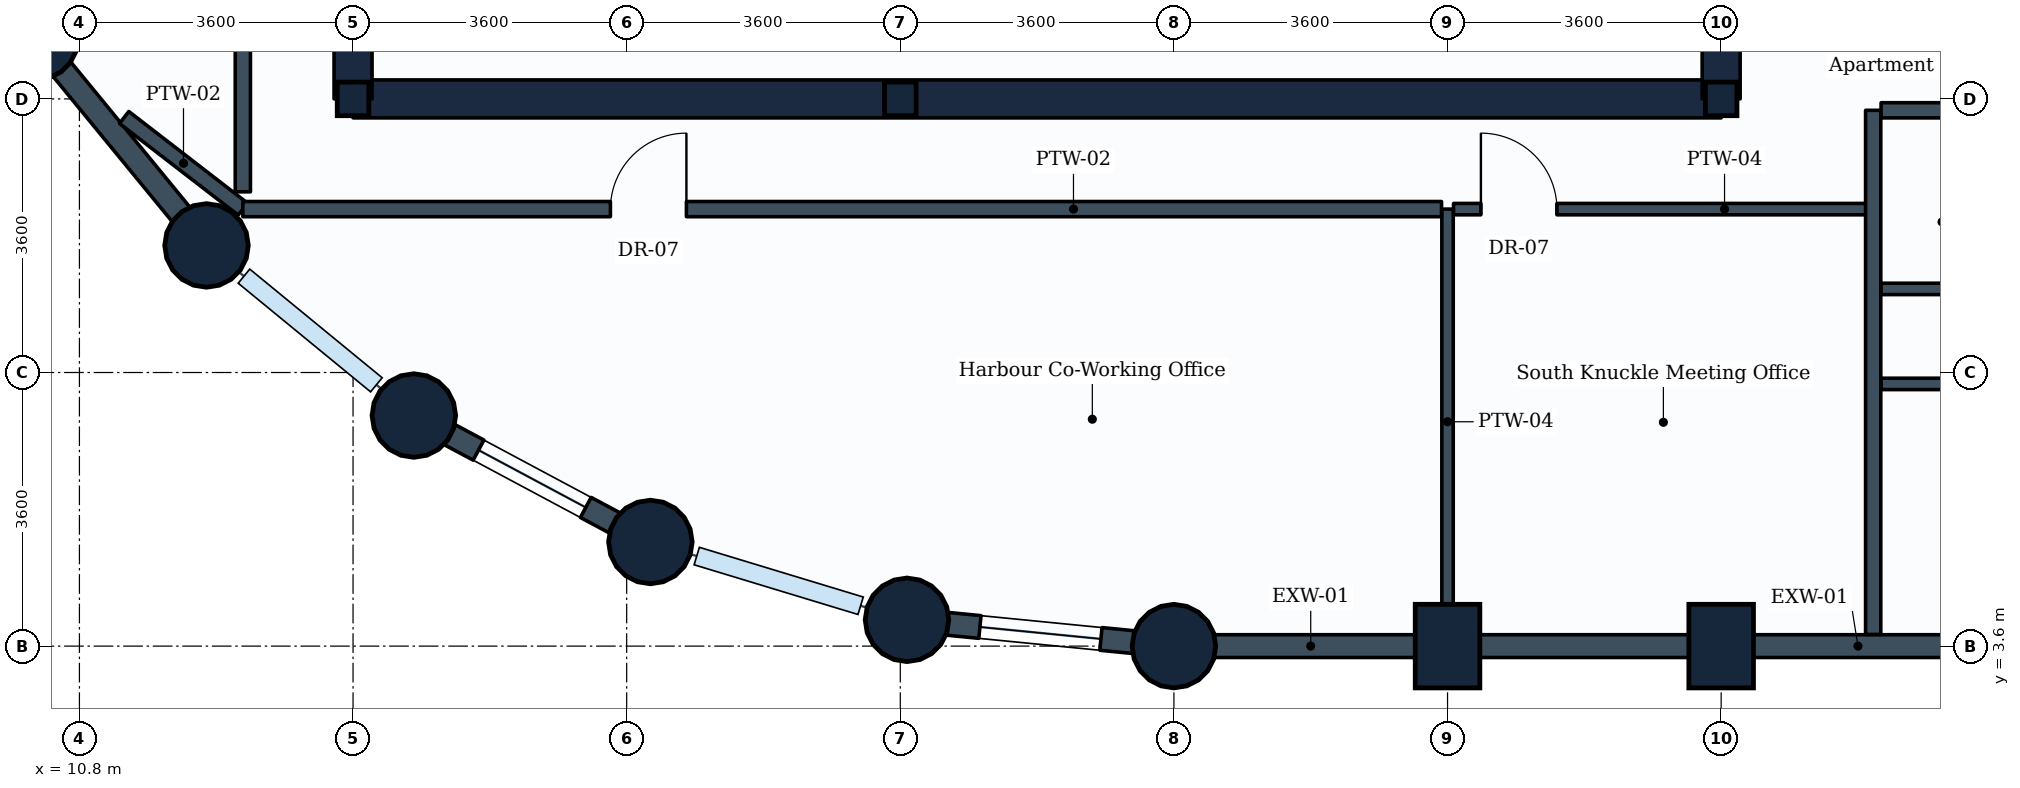
"""IFC4 building model, lengths in metres.
Left out: names, types, materials, properties, quantities, classifications, styles, units other than length and angle.
Written with IfcOpenShell. Run it as: python <this file> out.ifc"""

import sys

from ifc_helpers import new_model, si_unit, direction, frame, frame_2d, origin, origin_2d, place, context, subcontext, project, spatial, rectangle, circle, i_section, extrude, element, fill, save


model = new_model("IFC4")
c1 = context("Model", 3, precision=1e-05, world=origin(), true_north=direction((0.0, 1.0)))
c2 = subcontext(c1, "Body", "Model", "MODEL_VIEW")
j1 = project(units=[si_unit("LENGTHUNIT", "METRE"), si_unit("PLANEANGLEUNIT", "RADIAN")], contexts=[c1])
p1 = place(None, origin())
s1 = spatial("IfcSite", under=j1, at=p1, CompositionType="ELEMENT")
p2 = place(p1, origin())
s2 = spatial("IfcBuilding", under=s1, at=p2, CompositionType="ELEMENT")
p3 = place(p2, frame((0.0, 0.0, 123.8)))
s3 = spatial("IfcBuildingStorey", under=s2, at=p3, CompositionType="ELEMENT", Elevation=123.8)
for number, where, z_axis, x_axis in (
    (1, (10.234, 11.6, 0.0), (0.0, 0.0, 1.0), (1.0, 0.0, 0.0)),
    (2, (12.472, 8.872, 0.0), (0.0, 0.0, 1.0), (1.0, 0.0, 0.0)),
):
    element("IfcColumn", number, at=place(p3, frame(where, z_axis=z_axis, x_axis=x_axis)), inside=s3, PredefinedType="COLUMN", context=c2, shape_type="SweptSolid", body=[
        extrude(circle(Radius=0.55, at=origin_2d()), origin(), (0.0, 0.0, 1.0), 3.8),
    ])
p4 = place(p3, frame((14.4, 10.8, 0.0), z_axis=(0.0, 0.0, 1.0), x_axis=(1.0, 0.0, 0.0)))
e3 = element("IfcColumn", 3, at=p4, inside=s3, PredefinedType="COLUMN", context=c2, shape_type="SweptSolid", body=[
    extrude(i_section(OverallWidth=0.416, OverallDepth=0.442, WebThickness=0.025, FlangeThickness=0.041, FilletRadius=0.015, at=origin_2d()), origin(), (0.0, 0.0, 1.0), 3.8),
])
for number, where, z_axis, x_axis in (
    (4, (15.2, 6.634, 0.0), (0.0, 0.0, 1.0), (1.0, 0.0, 0.0)),
    (5, (18.312, 4.97, 0.0), (0.0, 0.0, 1.0), (1.0, 0.0, 0.0)),
):
    element("IfcColumn", number, at=place(p3, frame(where, z_axis=z_axis, x_axis=x_axis)), inside=s3, PredefinedType="COLUMN", context=c2, shape_type="SweptSolid", body=[
        extrude(circle(Radius=0.55, at=origin_2d()), origin(), (0.0, 0.0, 1.0), 3.8),
    ])
p5 = place(p3, frame((21.6, 10.8, 0.0), z_axis=(0.0, 0.0, 1.0), x_axis=(1.0, 0.0, 0.0)))
e6 = element("IfcColumn", 6, at=p5, inside=s3, PredefinedType="COLUMN", context=c2, shape_type="SweptSolid", body=[
    extrude(i_section(OverallWidth=0.416, OverallDepth=0.442, WebThickness=0.025, FlangeThickness=0.041, FilletRadius=0.015, at=origin_2d()), origin(), (0.0, 0.0, 1.0), 3.8),
])
for number, where, z_axis, x_axis in (
    (7, (21.688, 3.946, 0.0), (0.0, 0.0, 1.0), (1.0, 0.0, 0.0)),
    (8, (25.2, 3.6, 0.0), (0.0, 0.0, 1.0), (1.0, 0.0, 0.0)),
):
    element("IfcColumn", number, at=place(p3, frame(where, z_axis=z_axis, x_axis=x_axis)), inside=s3, PredefinedType="COLUMN", context=c2, shape_type="SweptSolid", body=[
        extrude(circle(Radius=0.55, at=origin_2d()), origin(), (0.0, 0.0, 1.0), 3.8),
    ])
for number, where, z_axis, x_axis in (
    (9, (28.8, 3.6, 0.0), (0.0, 0.0, 1.0), (1.0, 0.0, 0.0)),
    (10, (32.4, 3.6, 0.0), (0.0, 0.0, 1.0), (1.0, 0.0, 0.0)),
):
    element("IfcColumn", number, at=place(p3, frame(where, z_axis=z_axis, x_axis=x_axis)), inside=s3, PredefinedType="COLUMN", context=c2, shape_type="SweptSolid", body=[
        extrude(rectangle(XDim=0.85, YDim=1.1, at=origin_2d()), origin(), (0.0, 0.0, 1.0), 3.8),
    ])
p6 = place(p3, frame((32.4, 10.8, 0.0), z_axis=(0.0, 0.0, 1.0), x_axis=(1.0, 0.0, 0.0)))
e11 = element("IfcColumn", 11, at=p6, inside=s3, PredefinedType="COLUMN", context=c2, shape_type="SweptSolid", body=[
    extrude(i_section(OverallWidth=0.416, OverallDepth=0.442, WebThickness=0.025, FlangeThickness=0.041, FilletRadius=0.015, at=origin_2d()), origin(), (0.0, 0.0, 1.0), 3.8),
])
p7 = place(p3, frame((28.8, 3.6, 0.0), z_axis=(0.0, 0.0, 1.0), x_axis=(-1.0, 0.0, 0.0)))
e12 = element("IfcWall", 12, at=p7, inside=s3, PredefinedType="STANDARD", context=c2, shape_type="SweptSolid", body=[
    extrude(rectangle(XDim=3.6, YDim=0.3, at=frame_2d((1.8, 0.0))), origin(), (0.0, 0.0, 1.0), 2.93),
])
p8 = place(p3, frame((32.4, 3.6, 0.0), z_axis=(0.0, 0.0, 1.0), x_axis=(-1.0, 0.0, 0.0)))
e13 = element("IfcWall", 13, at=p8, inside=s3, PredefinedType="STANDARD", context=c2, shape_type="SweptSolid", body=[
    extrude(rectangle(XDim=3.6, YDim=0.3, at=frame_2d((1.8, 0.0))), origin(), (0.0, 0.0, 1.0), 2.93),
])
p9 = place(p3, frame((36.0, 3.6, 0.0), z_axis=(0.0, 0.0, 1.0), x_axis=(-1.0, 0.0, 0.0)))
e14 = element("IfcWall", 14, at=p9, inside=s3, PredefinedType="STANDARD", context=c2, shape_type="SweptSolid", body=[
    extrude(rectangle(XDim=3.6, YDim=0.3, at=frame_2d((1.8, 0.0))), origin(), (0.0, 0.0, 1.0), 2.93),
])
p10 = place(p3, frame((12.472, 8.872, 0.0), z_axis=(0.0, 0.0, 1.0), x_axis=(-0.634258295121, 0.773121216285, 0.0)))
e15 = element("IfcWall", 15, at=p10, inside=s3, PredefinedType="STANDARD", context=c2, shape_type="SweptSolid", body=[
    extrude(rectangle(XDim=3.529, YDim=0.3, at=frame_2d((1.764, 0.0))), origin(), (0.0, 0.0, 1.0), 2.93),
])
p11 = place(p3, frame((18.312, 4.97, 0.0), z_axis=(0.0, 0.0, 1.0), x_axis=(-0.881846862014, 0.471535907389, 0.0)))
e16 = element("IfcWall", 16, at=p11, inside=s3, PredefinedType="STANDARD", context=c2, shape_type="SweptSolid", body=[
    extrude(rectangle(XDim=3.529, YDim=0.3, at=frame_2d((1.765, 0.0))), origin(), (0.0, 0.0, 1.0), 2.93),
])
p12 = place(p11, frame((0.964, 0.0, 0.85)))
e17 = element("IfcOpeningElement", 17, at=p12, cuts=e16, PredefinedType="OPENING", context=c2, shape_type="SweptSolid", body=[
    extrude(rectangle(XDim=1.6, YDim=1.35, at=frame_2d((0.8, 0.675))), frame((0.0, 0.16, 0.0), z_axis=(0.0, -1.0, 0.0), x_axis=(1.0, 0.0, 0.0)), (0.0, 0.0, 1.0), 0.32),
])
p13 = place(p3, frame((25.2, 3.6, 0.0), z_axis=(0.0, 0.0, 1.0), x_axis=(-0.995183369056, 0.098030923459, 0.0)))
e18 = element("IfcWall", 18, at=p13, inside=s3, PredefinedType="STANDARD", context=c2, shape_type="SweptSolid", body=[
    extrude(rectangle(XDim=3.529, YDim=0.3, at=frame_2d((1.765, 0.0))), origin(), (0.0, 0.0, 1.0), 2.93),
])
p14 = place(p13, frame((0.965, 0.0, 0.85)))
e19 = element("IfcOpeningElement", 19, at=p14, cuts=e18, PredefinedType="OPENING", context=c2, shape_type="SweptSolid", body=[
    extrude(rectangle(XDim=1.6, YDim=1.35, at=frame_2d((0.8, 0.675))), frame((0.0, 0.16, 0.0), z_axis=(0.0, -1.0, 0.0), x_axis=(1.0, 0.0, 0.0)), (0.0, 0.0, 1.0), 0.32),
])
p15 = place(p3, frame((14.4, 10.8, 0.0), z_axis=(0.0, 0.0, 1.0), x_axis=(1.0, 0.0, 0.0)))
e20 = element("IfcWall", 20, at=p15, inside=s3, PredefinedType="SHEAR", context=c2, shape_type="SweptSolid", body=[
    extrude(rectangle(XDim=18.0, YDim=0.5, at=frame_2d((9.0, 0.0))), origin(), (0.0, 0.0, 1.0), 3.48),
])
p16 = place(p3, frame((14.4, 10.8, 0.0), z_axis=(0.0, 0.0, 1.0), x_axis=(0.0, 1.0, 0.0)))
e21 = element("IfcWall", 21, at=p16, inside=s3, PredefinedType="SHEAR", context=c2, shape_type="SweptSolid", body=[
    extrude(rectangle(XDim=14.4, YDim=0.5, at=frame_2d((7.2, 0.0))), origin(), (0.0, 0.0, 1.0), 3.48),
])
p17 = place(p16, frame((11.05, 0.0, 0.0)))
e22 = element("IfcOpeningElement", 22, at=p17, cuts=e21, PredefinedType="OPENING", context=c2, shape_type="SweptSolid", body=[
    extrude(rectangle(XDim=1.1, YDim=2.1, at=frame_2d((0.55, 1.05))), frame((0.0, 0.26, 0.0), z_axis=(0.0, -1.0, 0.0), x_axis=(1.0, 0.0, 0.0)), (0.0, 0.0, 1.0), 0.52),
])
p18 = place(p16, frame((4.9, 0.0, 0.0)))
e23 = element("IfcOpeningElement", 23, at=p18, cuts=e21, PredefinedType="OPENING", context=c2, shape_type="SweptSolid", body=[
    extrude(rectangle(XDim=1.2, YDim=2.1, at=frame_2d((0.6, 1.05))), frame((0.0, 0.26, 0.0), z_axis=(0.0, -1.0, 0.0), x_axis=(1.0, 0.0, 0.0)), (0.0, 0.0, 1.0), 0.52),
])
p19 = place(p16, frame((8.15, 0.0, 0.0)))
e24 = element("IfcOpeningElement", 24, at=p19, cuts=e21, PredefinedType="OPENING", context=c2, shape_type="SweptSolid", body=[
    extrude(rectangle(XDim=0.9, YDim=2.1, at=frame_2d((0.45, 1.05))), frame((0.0, 0.26, 0.0), z_axis=(0.0, -1.0, 0.0), x_axis=(1.0, 0.0, 0.0)), (0.0, 0.0, 1.0), 0.52),
])
p20 = place(p3, frame((32.4, 10.8, 0.0), z_axis=(0.0, 0.0, 1.0), x_axis=(0.0, 1.0, 0.0)))
e25 = element("IfcWall", 25, at=p20, inside=s3, PredefinedType="SHEAR", context=c2, shape_type="SweptSolid", body=[
    extrude(rectangle(XDim=14.4, YDim=0.5, at=frame_2d((7.2, 0.0))), origin(), (0.0, 0.0, 1.0), 3.48),
])
p21 = place(p20, frame((4.35, 0.0, 0.0)))
e26 = element("IfcOpeningElement", 26, at=p21, cuts=e25, PredefinedType="OPENING", context=c2, shape_type="SweptSolid", body=[
    extrude(rectangle(XDim=1.2, YDim=2.1, at=frame_2d((0.6, 1.05))), frame((0.0, 0.26, 0.0), z_axis=(0.0, -1.0, 0.0), x_axis=(1.0, 0.0, 0.0)), (0.0, 0.0, 1.0), 0.52),
])
p22 = place(p20, frame((10.0, 0.0, 0.0)))
e27 = element("IfcOpeningElement", 27, at=p22, cuts=e25, PredefinedType="OPENING", context=c2, shape_type="SweptSolid", body=[
    extrude(rectangle(XDim=1.2, YDim=2.1, at=frame_2d((0.6, 1.05))), frame((0.0, 0.26, 0.0), z_axis=(0.0, -1.0, 0.0), x_axis=(1.0, 0.0, 0.0)), (0.0, 0.0, 1.0), 0.52),
])
p23 = place(p3, frame((28.8, 9.35, 0.0), z_axis=(0.0, 0.0, 1.0), x_axis=(0.0, -1.0, 0.0)))
e28 = element("IfcWall", 28, at=p23, inside=s3, PredefinedType="PARTITIONING", context=c2, shape_type="SweptSolid", body=[
    extrude(rectangle(XDim=5.596, YDim=0.15, at=frame_2d((2.798, 0.0))), origin(), (0.0, 0.0, 1.0), 3.465),
])
p24 = place(p3, frame((12.95, 9.35, 0.0), z_axis=(0.0, 0.0, 1.0), x_axis=(-0.7915325665, 0.611126988579, 0.0)))
e29 = element("IfcWall", 29, at=p24, inside=s3, PredefinedType="PARTITIONING", context=c2, shape_type="SweptSolid", body=[
    extrude(rectangle(XDim=1.973, YDim=0.2, at=frame_2d((0.987, 0.0))), origin(), (0.0, 0.0, 1.0), 2.93),
])
p25 = place(p3, frame((12.95, 9.577, 0.0), z_axis=(0.0, 0.0, 1.0), x_axis=(0.0, 1.0, 0.0)))
e30 = element("IfcWall", 30, at=p25, inside=s3, PredefinedType="PARTITIONING", context=c2, shape_type="SweptSolid", body=[
    extrude(rectangle(XDim=15.544, YDim=0.2, at=frame_2d((7.772, 0.0))), origin(), (0.0, 0.0, 1.0), 3.1),
])
p26 = place(p25, frame((6.763, 0.0, 0.0)))
e31 = element("IfcOpeningElement", 31, at=p26, cuts=e30, PredefinedType="OPENING", context=c2, shape_type="SweptSolid", body=[
    extrude(rectangle(XDim=1.0, YDim=2.1, at=frame_2d((0.5, 1.05))), frame((0.0, 0.11, 0.0), z_axis=(0.0, -1.0, 0.0), x_axis=(1.0, 0.0, 0.0)), (0.0, 0.0, 1.0), 0.22),
])
p27 = place(p3, frame((12.95, 9.35, 0.0), z_axis=(0.0, 0.0, 1.0), x_axis=(1.0, 0.0, 0.0)))
e32 = element("IfcWall", 32, at=p27, inside=s3, PredefinedType="PARTITIONING", context=c2, shape_type="SweptSolid", body=[
    extrude(rectangle(XDim=15.771, YDim=0.2, at=frame_2d((7.885, 0.0))), origin(), (0.0, 0.0, 1.0), 3.1),
])
p28 = place(p27, frame((4.836, 0.0, 0.0)))
e33 = element("IfcOpeningElement", 33, at=p28, cuts=e32, PredefinedType="OPENING", context=c2, shape_type="SweptSolid", body=[
    extrude(rectangle(XDim=1.0, YDim=2.1, at=frame_2d((0.5, 1.05))), frame((0.0, 0.11, 0.0), z_axis=(0.0, -1.0, 0.0), x_axis=(1.0, 0.0, 0.0)), (0.0, 0.0, 1.0), 0.22),
])
p29 = place(p3, frame((28.879, 9.35, 0.0), z_axis=(0.0, 0.0, 1.0), x_axis=(1.0, 0.0, 0.0)))
e34 = element("IfcWall", 34, at=p29, inside=s3, PredefinedType="PARTITIONING", context=c2, shape_type="SweptSolid", body=[
    extrude(rectangle(XDim=5.521, YDim=0.15, at=frame_2d((2.76, 0.0))), origin(), (0.0, 0.0, 1.0), 3.465),
])
p30 = place(p29, frame((0.36, 0.0, 0.0)))
e35 = element("IfcOpeningElement", 35, at=p30, cuts=e34, PredefinedType="OPENING", context=c2, shape_type="SweptSolid", body=[
    extrude(rectangle(XDim=1.0, YDim=2.1, at=frame_2d((0.5, 1.05))), frame((0.0, 0.085, 0.0), z_axis=(0.0, -1.0, 0.0), x_axis=(1.0, 0.0, 0.0)), (0.0, 0.0, 1.0), 0.17),
])
p31 = place(p3, frame((34.4, 3.754, 0.0), z_axis=(0.0, 0.0, 1.0), x_axis=(0.0, 1.0, 0.0)))
e36 = element("IfcWall", 36, at=p31, inside=s3, PredefinedType="PARTITIONING", context=c2, shape_type="SweptSolid", body=[
    extrude(rectangle(XDim=6.896, YDim=0.2, at=frame_2d((3.448, 0.0))), origin(), (0.0, 0.0, 1.0), 2.93),
])
p32 = place(p3, frame((34.504, 10.65, 0.0), z_axis=(0.0, 0.0, 1.0), x_axis=(1.0, 0.0, 0.0)))
e37 = element("IfcWall", 37, at=p32, inside=s3, PredefinedType="PARTITIONING", context=c2, shape_type="SweptSolid", body=[
    extrude(rectangle(XDim=2.296, YDim=0.2, at=frame_2d((1.148, 0.0))), origin(), (0.0, 0.0, 1.0), 3.01),
])
p33 = place(p3, frame((34.504, 8.3, 0.0), z_axis=(0.0, 0.0, 1.0), x_axis=(1.0, 0.0, 0.0)))
e38 = element("IfcWall", 38, at=p33, inside=s3, PredefinedType="PARTITIONING", context=c2, shape_type="SweptSolid", body=[
    extrude(rectangle(XDim=2.217, YDim=0.15, at=frame_2d((1.108, 0.0))), origin(), (0.0, 0.0, 1.0), 3.1),
])
p34 = place(p3, frame((34.504, 7.05, 0.0), z_axis=(0.0, 0.0, 1.0), x_axis=(1.0, 0.0, 0.0)))
e39 = element("IfcWall", 39, at=p34, inside=s3, PredefinedType="PARTITIONING", context=c2, shape_type="SweptSolid", body=[
    extrude(rectangle(XDim=2.996, YDim=0.15, at=frame_2d((1.498, 0.0))), origin(), (0.0, 0.0, 1.0), 3.01),
])
p35 = place(p34, frame((1.021, 0.0, 0.0)))
e40 = element("IfcOpeningElement", 40, at=p35, cuts=e39, PredefinedType="OPENING", context=c2, shape_type="SweptSolid", body=[
    extrude(rectangle(XDim=0.85, YDim=2.1, at=frame_2d((0.425, 1.05))), frame((0.0, 0.085, 0.0), z_axis=(0.0, -1.0, 0.0), x_axis=(1.0, 0.0, 0.0)), (0.0, 0.0, 1.0), 0.17),
])
p36 = place(p12, origin())
e41 = element("IfcWindow", 41, at=p36, inside=s3, PartitioningType="SINGLE_PANEL", PredefinedType="WINDOW", context=c2, shape_type="SweptSolid", body=[
    extrude(rectangle(XDim=1.6, YDim=1.35, at=frame_2d((0.8, 0.675))), frame((0.0, 0.03, 0.0), z_axis=(0.0, -1.0, 0.0), x_axis=(1.0, 0.0, 0.0)), (0.0, 0.0, 1.0), 0.06),
])
fill(e17, e41)
p37 = place(p14, origin())
e42 = element("IfcWindow", 42, at=p37, inside=s3, PartitioningType="SINGLE_PANEL", PredefinedType="WINDOW", context=c2, shape_type="SweptSolid", body=[
    extrude(rectangle(XDim=1.6, YDim=1.35, at=frame_2d((0.8, 0.675))), frame((0.0, 0.03, 0.0), z_axis=(0.0, -1.0, 0.0), x_axis=(1.0, 0.0, 0.0)), (0.0, 0.0, 1.0), 0.06),
])
fill(e19, e42)
p38 = place(p28, origin())
e43 = element("IfcDoor", 43, at=p38, inside=s3, OperationType="SINGLE_SWING_RIGHT", PredefinedType="DOOR", context=c2, shape_type="SweptSolid", body=[
    extrude(rectangle(XDim=1.0, YDim=2.1, at=frame_2d((0.5, 1.05))), frame((0.0, 0.025, 0.0), z_axis=(0.0, -1.0, 0.0), x_axis=(1.0, 0.0, 0.0)), (0.0, 0.0, 1.0), 0.05),
])
fill(e33, e43)
p39 = place(p30, origin())
e44 = element("IfcDoor", 44, at=p39, inside=s3, OperationType="SINGLE_SWING_LEFT", PredefinedType="DOOR", context=c2, shape_type="SweptSolid", body=[
    extrude(rectangle(XDim=1.0, YDim=2.1, at=frame_2d((0.5, 1.05))), frame((0.0, 0.025, 0.0), z_axis=(0.0, -1.0, 0.0), x_axis=(1.0, 0.0, 0.0)), (0.0, 0.0, 1.0), 0.05),
])
fill(e35, e44)
save(model, sys.argv[1])
